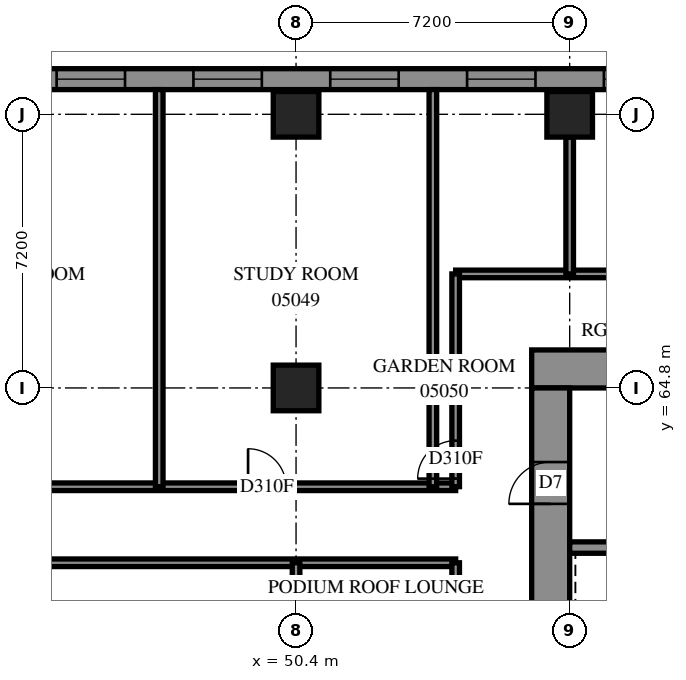
"""IFC4 building model, lengths in metres.
Left out: names, types, materials, properties, quantities, classifications, styles, units other than length and angle.
Written with IfcOpenShell. Run it as: python <this file> out.ifc"""

import sys

from ifc_helpers import new_model, si_unit, direction, frame, frame_2d, origin, origin_2d, place, context, subcontext, project, spatial, polyline, rectangle, outline, extrude, element, fill, save


model = new_model("IFC4")
c1 = context("Model", 3, precision=1e-05, world=origin(), true_north=direction((0.0, 1.0)))
c2 = subcontext(c1, "Body", "Model", "MODEL_VIEW")
j1 = project(units=[si_unit("LENGTHUNIT", "METRE"), si_unit("PLANEANGLEUNIT", "RADIAN")], contexts=[c1])
p1 = place(None, origin())
s1 = spatial("IfcSite", under=j1, at=p1, CompositionType="ELEMENT")
p2 = place(p1, origin())
s2 = spatial("IfcBuilding", under=s1, at=p2, CompositionType="ELEMENT")
p3 = place(p2, frame((0.0, 0.0, 22.8)))
s3 = spatial("IfcBuildingStorey", under=s2, at=p3, CompositionType="ELEMENT", Elevation=22.8)
for number, where, z_axis, x_axis in (
    (1, (50.4, 64.8, 0.0), (0.0, 0.0, 1.0), (1.0, 0.0, 0.0)),
    (2, (50.4, 72.0, 0.0), (0.0, 0.0, 1.0), (1.0, 0.0, 0.0)),
    (3, (57.6, 72.0, 0.0), (0.0, 0.0, 1.0), (1.0, 0.0, 0.0)),
):
    element("IfcColumn", number, at=place(p3, frame(where, z_axis=z_axis, x_axis=x_axis)), inside=s3, PredefinedType="COLUMN", context=c2, shape_type="SweptSolid", body=[
        extrude(rectangle(XDim=1.2, YDim=1.2, at=origin_2d()), origin(), (0.0, 0.0, 1.0), 3.9),
    ])
p4 = place(p3, frame((56.6, 65.3, -0.4), z_axis=(0.0, 0.0, 1.0), x_axis=(1.0, 0.0, 0.0)))
e4 = element("IfcWall", 4, at=p4, inside=s3, PredefinedType="SHEAR", context=c2, shape_type="SweptSolid", body=[
    extrude(rectangle(XDim=16.4, YDim=1.0, at=frame_2d((8.2, 0.0))), origin(), (0.0, 0.0, 1.0), 3.6),
])
p5 = place(p4, frame((11.0, 0.0, 0.4)))
e5 = element("IfcOpeningElement", 5, at=p5, cuts=e4, PredefinedType="OPENING", context=c2, shape_type="SweptSolid", body=[
    extrude(rectangle(XDim=0.8, YDim=2.1, at=frame_2d((0.4, 1.05))), frame((0.0, 0.51, 0.0), z_axis=(0.0, -1.0, 0.0), x_axis=(1.0, 0.0, 0.0)), (0.0, 0.0, 1.0), 1.02),
])
p6 = place(p3, frame((57.1, 50.4, -0.4), z_axis=(0.0, 0.0, 1.0), x_axis=(0.0, 1.0, 0.0)))
e6 = element("IfcWall", 6, at=p6, inside=s3, PredefinedType="SHEAR", context=c2, shape_type="SweptSolid", body=[
    extrude(rectangle(XDim=14.4, YDim=1.0, at=frame_2d((7.2, 0.0))), origin(), (0.0, 0.0, 1.0), 3.6),
])
p7 = place(p6, frame((4.55, 0.0, 0.4)))
e7 = element("IfcOpeningElement", 7, at=p7, cuts=e6, PredefinedType="OPENING", context=c2, shape_type="SweptSolid", body=[
    extrude(rectangle(XDim=1.1, YDim=2.1, at=frame_2d((0.55, 1.05))), frame((0.0, 0.51, 0.0), z_axis=(0.0, -1.0, 0.0), x_axis=(1.0, 0.0, 0.0)), (0.0, 0.0, 1.0), 1.02),
])
p8 = place(p6, frame((11.35, 0.0, 0.4)))
e8 = element("IfcOpeningElement", 8, at=p8, cuts=e6, PredefinedType="OPENING", context=c2, shape_type="SweptSolid", body=[
    extrude(rectangle(XDim=1.1, YDim=2.1, at=frame_2d((0.55, 1.05))), frame((0.0, 0.51, 0.0), z_axis=(0.0, -1.0, 0.0), x_axis=(1.0, 0.0, 0.0)), (0.0, 0.0, 1.0), 1.02),
])
p9 = place(p3, frame((57.6, 60.6, 0.0), z_axis=(0.0, 0.0, 1.0), x_axis=(1.0, 0.0, 0.0)))
e9 = element("IfcWall", 9, at=p9, inside=s3, PredefinedType="SOLIDWALL", context=c2, shape_type="SweptSolid", body=[
    extrude(rectangle(XDim=7.2, YDim=0.3, at=frame_2d((3.6, 0.0))), origin(), (0.0, 0.0, 1.0), 3.9),
])
p10 = place(p3, frame((79.583, 72.925, 0.0), z_axis=(0.0, 0.0, 1.0), x_axis=(-1.0, 0.0, 0.0)))
e10 = element("IfcWall", 10, at=p10, inside=s3, PredefinedType="SOLIDWALL", context=c2, shape_type="SweptSolid", body=[
    extrude(outline(polyline([(-0.114, -0.275), (79.583, -0.275), (79.033, 0.275), (0.114, 0.275), (-0.114, -0.275)])), origin(), (0.0, 0.0, 1.0), 3.9),
])
p11 = place(p10, frame((1.249, 0.0, 0.7)))
e11 = element("IfcOpeningElement", 11, at=p11, cuts=e10, PredefinedType="OPENING", context=c2, shape_type="SweptSolid", body=[
    extrude(rectangle(XDim=1.8, YDim=2.4, at=frame_2d((0.9, 1.2))), frame((0.0, 0.285, 0.0), z_axis=(0.0, -1.0, 0.0), x_axis=(1.0, 0.0, 0.0)), (0.0, 0.0, 1.0), 0.57),
])
p12 = place(p10, frame((4.883, 0.0, 0.7)))
e12 = element("IfcOpeningElement", 12, at=p12, cuts=e10, PredefinedType="OPENING", context=c2, shape_type="SweptSolid", body=[
    extrude(rectangle(XDim=1.8, YDim=2.4, at=frame_2d((0.9, 1.2))), frame((0.0, 0.285, 0.0), z_axis=(0.0, -1.0, 0.0), x_axis=(1.0, 0.0, 0.0)), (0.0, 0.0, 1.0), 0.57),
])
p13 = place(p10, frame((8.483, 0.0, 0.7)))
e13 = element("IfcOpeningElement", 13, at=p13, cuts=e10, PredefinedType="OPENING", context=c2, shape_type="SweptSolid", body=[
    extrude(rectangle(XDim=1.8, YDim=2.4, at=frame_2d((0.9, 1.2))), frame((0.0, 0.285, 0.0), z_axis=(0.0, -1.0, 0.0), x_axis=(1.0, 0.0, 0.0)), (0.0, 0.0, 1.0), 0.57),
])
p14 = place(p10, frame((12.083, 0.0, 0.7)))
e14 = element("IfcOpeningElement", 14, at=p14, cuts=e10, PredefinedType="OPENING", context=c2, shape_type="SweptSolid", body=[
    extrude(rectangle(XDim=1.8, YDim=2.4, at=frame_2d((0.9, 1.2))), frame((0.0, 0.285, 0.0), z_axis=(0.0, -1.0, 0.0), x_axis=(1.0, 0.0, 0.0)), (0.0, 0.0, 1.0), 0.57),
])
p15 = place(p10, frame((15.683, 0.0, 0.7)))
e15 = element("IfcOpeningElement", 15, at=p15, cuts=e10, PredefinedType="OPENING", context=c2, shape_type="SweptSolid", body=[
    extrude(rectangle(XDim=1.8, YDim=2.4, at=frame_2d((0.9, 1.2))), frame((0.0, 0.285, 0.0), z_axis=(0.0, -1.0, 0.0), x_axis=(1.0, 0.0, 0.0)), (0.0, 0.0, 1.0), 0.57),
])
p16 = place(p10, frame((19.283, 0.0, 0.7)))
e16 = element("IfcOpeningElement", 16, at=p16, cuts=e10, PredefinedType="OPENING", context=c2, shape_type="SweptSolid", body=[
    extrude(rectangle(XDim=1.8, YDim=2.4, at=frame_2d((0.9, 1.2))), frame((0.0, 0.285, 0.0), z_axis=(0.0, -1.0, 0.0), x_axis=(1.0, 0.0, 0.0)), (0.0, 0.0, 1.0), 0.57),
])
p17 = place(p10, frame((22.883, 0.0, 0.7)))
e17 = element("IfcOpeningElement", 17, at=p17, cuts=e10, PredefinedType="OPENING", context=c2, shape_type="SweptSolid", body=[
    extrude(rectangle(XDim=1.8, YDim=2.4, at=frame_2d((0.9, 1.2))), frame((0.0, 0.285, 0.0), z_axis=(0.0, -1.0, 0.0), x_axis=(1.0, 0.0, 0.0)), (0.0, 0.0, 1.0), 0.57),
])
p18 = place(p10, frame((26.483, 0.0, 0.7)))
e18 = element("IfcOpeningElement", 18, at=p18, cuts=e10, PredefinedType="OPENING", context=c2, shape_type="SweptSolid", body=[
    extrude(rectangle(XDim=1.8, YDim=2.4, at=frame_2d((0.9, 1.2))), frame((0.0, 0.285, 0.0), z_axis=(0.0, -1.0, 0.0), x_axis=(1.0, 0.0, 0.0)), (0.0, 0.0, 1.0), 0.57),
])
p19 = place(p10, frame((30.083, 0.0, 0.7)))
e19 = element("IfcOpeningElement", 19, at=p19, cuts=e10, PredefinedType="OPENING", context=c2, shape_type="SweptSolid", body=[
    extrude(rectangle(XDim=1.8, YDim=2.4, at=frame_2d((0.9, 1.2))), frame((0.0, 0.285, 0.0), z_axis=(0.0, -1.0, 0.0), x_axis=(1.0, 0.0, 0.0)), (0.0, 0.0, 1.0), 0.57),
])
p20 = place(p10, frame((33.683, 0.0, 0.7)))
e20 = element("IfcOpeningElement", 20, at=p20, cuts=e10, PredefinedType="OPENING", context=c2, shape_type="SweptSolid", body=[
    extrude(rectangle(XDim=1.8, YDim=2.4, at=frame_2d((0.9, 1.2))), frame((0.0, 0.285, 0.0), z_axis=(0.0, -1.0, 0.0), x_axis=(1.0, 0.0, 0.0)), (0.0, 0.0, 1.0), 0.57),
])
p21 = place(p10, frame((37.283, 0.0, 0.7)))
e21 = element("IfcOpeningElement", 21, at=p21, cuts=e10, PredefinedType="OPENING", context=c2, shape_type="SweptSolid", body=[
    extrude(rectangle(XDim=1.8, YDim=2.4, at=frame_2d((0.9, 1.2))), frame((0.0, 0.285, 0.0), z_axis=(0.0, -1.0, 0.0), x_axis=(1.0, 0.0, 0.0)), (0.0, 0.0, 1.0), 0.57),
])
p22 = place(p10, frame((40.883, 0.0, 0.7)))
e22 = element("IfcOpeningElement", 22, at=p22, cuts=e10, PredefinedType="OPENING", context=c2, shape_type="SweptSolid", body=[
    extrude(rectangle(XDim=1.8, YDim=2.4, at=frame_2d((0.9, 1.2))), frame((0.0, 0.285, 0.0), z_axis=(0.0, -1.0, 0.0), x_axis=(1.0, 0.0, 0.0)), (0.0, 0.0, 1.0), 0.57),
])
p23 = place(p10, frame((44.483, 0.0, 0.7)))
e23 = element("IfcOpeningElement", 23, at=p23, cuts=e10, PredefinedType="OPENING", context=c2, shape_type="SweptSolid", body=[
    extrude(rectangle(XDim=1.8, YDim=2.4, at=frame_2d((0.9, 1.2))), frame((0.0, 0.285, 0.0), z_axis=(0.0, -1.0, 0.0), x_axis=(1.0, 0.0, 0.0)), (0.0, 0.0, 1.0), 0.57),
])
p24 = place(p10, frame((48.083, 0.0, 0.7)))
e24 = element("IfcOpeningElement", 24, at=p24, cuts=e10, PredefinedType="OPENING", context=c2, shape_type="SweptSolid", body=[
    extrude(rectangle(XDim=1.8, YDim=2.4, at=frame_2d((0.9, 1.2))), frame((0.0, 0.285, 0.0), z_axis=(0.0, -1.0, 0.0), x_axis=(1.0, 0.0, 0.0)), (0.0, 0.0, 1.0), 0.57),
])
p25 = place(p10, frame((51.683, 0.0, 0.7)))
e25 = element("IfcOpeningElement", 25, at=p25, cuts=e10, PredefinedType="OPENING", context=c2, shape_type="SweptSolid", body=[
    extrude(rectangle(XDim=1.8, YDim=2.4, at=frame_2d((0.9, 1.2))), frame((0.0, 0.285, 0.0), z_axis=(0.0, -1.0, 0.0), x_axis=(1.0, 0.0, 0.0)), (0.0, 0.0, 1.0), 0.57),
])
p26 = place(p10, frame((55.283, 0.0, 0.7)))
e26 = element("IfcOpeningElement", 26, at=p26, cuts=e10, PredefinedType="OPENING", context=c2, shape_type="SweptSolid", body=[
    extrude(rectangle(XDim=1.8, YDim=2.4, at=frame_2d((0.9, 1.2))), frame((0.0, 0.285, 0.0), z_axis=(0.0, -1.0, 0.0), x_axis=(1.0, 0.0, 0.0)), (0.0, 0.0, 1.0), 0.57),
])
p27 = place(p10, frame((58.883, 0.0, 0.7)))
e27 = element("IfcOpeningElement", 27, at=p27, cuts=e10, PredefinedType="OPENING", context=c2, shape_type="SweptSolid", body=[
    extrude(rectangle(XDim=1.8, YDim=2.4, at=frame_2d((0.9, 1.2))), frame((0.0, 0.285, 0.0), z_axis=(0.0, -1.0, 0.0), x_axis=(1.0, 0.0, 0.0)), (0.0, 0.0, 1.0), 0.57),
])
p28 = place(p10, frame((62.483, 0.0, 0.7)))
e28 = element("IfcOpeningElement", 28, at=p28, cuts=e10, PredefinedType="OPENING", context=c2, shape_type="SweptSolid", body=[
    extrude(rectangle(XDim=1.8, YDim=2.4, at=frame_2d((0.9, 1.2))), frame((0.0, 0.285, 0.0), z_axis=(0.0, -1.0, 0.0), x_axis=(1.0, 0.0, 0.0)), (0.0, 0.0, 1.0), 0.57),
])
p29 = place(p10, frame((66.083, 0.0, 0.7)))
e29 = element("IfcOpeningElement", 29, at=p29, cuts=e10, PredefinedType="OPENING", context=c2, shape_type="SweptSolid", body=[
    extrude(rectangle(XDim=1.8, YDim=2.4, at=frame_2d((0.9, 1.2))), frame((0.0, 0.285, 0.0), z_axis=(0.0, -1.0, 0.0), x_axis=(1.0, 0.0, 0.0)), (0.0, 0.0, 1.0), 0.57),
])
p30 = place(p10, frame((69.683, 0.0, 0.7)))
e30 = element("IfcOpeningElement", 30, at=p30, cuts=e10, PredefinedType="OPENING", context=c2, shape_type="SweptSolid", body=[
    extrude(rectangle(XDim=1.8, YDim=2.4, at=frame_2d((0.9, 1.2))), frame((0.0, 0.285, 0.0), z_axis=(0.0, -1.0, 0.0), x_axis=(1.0, 0.0, 0.0)), (0.0, 0.0, 1.0), 0.57),
])
p31 = place(p10, frame((73.683, 0.0, 0.7)))
e31 = element("IfcOpeningElement", 31, at=p31, cuts=e10, PredefinedType="OPENING", context=c2, shape_type="SweptSolid", body=[
    extrude(rectangle(XDim=1.8, YDim=2.4, at=frame_2d((0.9, 1.2))), frame((0.0, 0.285, 0.0), z_axis=(0.0, -1.0, 0.0), x_axis=(1.0, 0.0, 0.0)), (0.0, 0.0, 1.0), 0.57),
])
p32 = place(p10, frame((76.508, 0.0, 0.7)))
e32 = element("IfcOpeningElement", 32, at=p32, cuts=e10, PredefinedType="OPENING", context=c2, shape_type="SweptSolid", body=[
    extrude(rectangle(XDim=1.8, YDim=2.4, at=frame_2d((0.9, 1.2))), frame((0.0, 0.285, 0.0), z_axis=(0.0, -1.0, 0.0), x_axis=(1.0, 0.0, 0.0)), (0.0, 0.0, 1.0), 0.57),
])
p33 = place(p3, frame((0.002, 60.2, 0.0), z_axis=(0.0, 0.0, 1.0), x_axis=(1.0, 0.0, 0.0)))
e33 = element("IfcWall", 33, at=p33, inside=s3, PredefinedType="PARTITIONING", context=c2, shape_type="SweptSolid", body=[
    extrude(rectangle(XDim=54.598, YDim=0.2, at=frame_2d((27.299, 0.0))), origin(), (0.0, 0.0, 1.0), 3.9),
])
p34 = place(p33, frame((3.863, 0.0, 0.0)))
e34 = element("IfcOpeningElement", 34, at=p34, cuts=e33, PredefinedType="OPENING", context=c2, shape_type="SweptSolid", body=[
    extrude(rectangle(XDim=1.0, YDim=2.1, at=frame_2d((0.5, 1.05))), frame((0.0, 0.11, 0.0), z_axis=(0.0, -1.0, 0.0), x_axis=(1.0, 0.0, 0.0)), (0.0, 0.0, 1.0), 0.22),
])
p35 = place(p3, frame((0.002, 62.2, 0.0), z_axis=(0.0, 0.0, 1.0), x_axis=(1.0, 0.0, 0.0)))
e35 = element("IfcWall", 35, at=p35, inside=s3, PredefinedType="PARTITIONING", context=c2, shape_type="SweptSolid", body=[
    extrude(rectangle(XDim=54.598, YDim=0.2, at=frame_2d((27.299, 0.0))), origin(), (0.0, 0.0, 1.0), 3.9),
])
p36 = place(p35, frame((8.667, 0.0, 0.0)))
e36 = element("IfcOpeningElement", 36, at=p36, cuts=e35, PredefinedType="OPENING", context=c2, shape_type="SweptSolid", body=[
    extrude(rectangle(XDim=1.0, YDim=2.1, at=frame_2d((0.5, 1.05))), frame((0.0, 0.11, 0.0), z_axis=(0.0, -1.0, 0.0), x_axis=(1.0, 0.0, 0.0)), (0.0, 0.0, 1.0), 0.22),
])
p37 = place(p35, frame((13.136, 0.0, 0.0)))
e37 = element("IfcOpeningElement", 37, at=p37, cuts=e35, PredefinedType="OPENING", context=c2, shape_type="SweptSolid", body=[
    extrude(rectangle(XDim=1.0, YDim=2.1, at=frame_2d((0.5, 1.05))), frame((0.0, 0.11, 0.0), z_axis=(0.0, -1.0, 0.0), x_axis=(1.0, 0.0, 0.0)), (0.0, 0.0, 1.0), 0.22),
])
p38 = place(p35, frame((20.335, 0.0, 0.0)))
e38 = element("IfcOpeningElement", 38, at=p38, cuts=e35, PredefinedType="OPENING", context=c2, shape_type="SweptSolid", body=[
    extrude(rectangle(XDim=1.0, YDim=2.1, at=frame_2d((0.5, 1.05))), frame((0.0, 0.11, 0.0), z_axis=(0.0, -1.0, 0.0), x_axis=(1.0, 0.0, 0.0)), (0.0, 0.0, 1.0), 0.22),
])
p39 = place(p35, frame((27.535, 0.0, 0.0)))
e39 = element("IfcOpeningElement", 39, at=p39, cuts=e35, PredefinedType="OPENING", context=c2, shape_type="SweptSolid", body=[
    extrude(rectangle(XDim=1.0, YDim=2.1, at=frame_2d((0.5, 1.05))), frame((0.0, 0.11, 0.0), z_axis=(0.0, -1.0, 0.0), x_axis=(1.0, 0.0, 0.0)), (0.0, 0.0, 1.0), 0.22),
])
p40 = place(p35, frame((34.736, 0.0, 0.0)))
e40 = element("IfcOpeningElement", 40, at=p40, cuts=e35, PredefinedType="OPENING", context=c2, shape_type="SweptSolid", body=[
    extrude(rectangle(XDim=1.0, YDim=2.1, at=frame_2d((0.5, 1.05))), frame((0.0, 0.11, 0.0), z_axis=(0.0, -1.0, 0.0), x_axis=(1.0, 0.0, 0.0)), (0.0, 0.0, 1.0), 0.22),
])
p41 = place(p35, frame((41.935, 0.0, 0.0)))
e41 = element("IfcOpeningElement", 41, at=p41, cuts=e35, PredefinedType="OPENING", context=c2, shape_type="SweptSolid", body=[
    extrude(rectangle(XDim=1.0, YDim=2.1, at=frame_2d((0.5, 1.05))), frame((0.0, 0.11, 0.0), z_axis=(0.0, -1.0, 0.0), x_axis=(1.0, 0.0, 0.0)), (0.0, 0.0, 1.0), 0.22),
])
p42 = place(p35, frame((49.136, 0.0, 0.0)))
e42 = element("IfcOpeningElement", 42, at=p42, cuts=e35, PredefinedType="OPENING", context=c2, shape_type="SweptSolid", body=[
    extrude(rectangle(XDim=1.0, YDim=2.1, at=frame_2d((0.5, 1.05))), frame((0.0, 0.11, 0.0), z_axis=(0.0, -1.0, 0.0), x_axis=(1.0, 0.0, 0.0)), (0.0, 0.0, 1.0), 0.22),
])
p43 = place(p35, frame((4.803, 0.0, 0.0)))
e43 = element("IfcOpeningElement", 43, at=p43, cuts=e35, PredefinedType="OPENING", context=c2, shape_type="SweptSolid", body=[
    extrude(rectangle(XDim=1.0, YDim=2.1, at=frame_2d((0.5, 1.05))), frame((0.0, 0.11, 0.0), z_axis=(0.0, -1.0, 0.0), x_axis=(1.0, 0.0, 0.0)), (0.0, 0.0, 1.0), 0.22),
])
p44 = place(p3, frame((54.6, 67.8, 0.0), z_axis=(0.0, 0.0, 1.0), x_axis=(1.0, 0.0, 0.0)))
e44 = element("IfcWall", 44, at=p44, inside=s3, PredefinedType="PARTITIONING", context=c2, shape_type="SweptSolid", body=[
    extrude(rectangle(XDim=20.4, YDim=0.2, at=frame_2d((10.2, 0.0))), origin(), (0.0, 0.0, 1.0), 3.9),
])
p45 = place(p44, frame((19.271, 0.0, 0.0)))
e45 = element("IfcOpeningElement", 45, at=p45, cuts=e44, PredefinedType="OPENING", context=c2, shape_type="SweptSolid", body=[
    extrude(rectangle(XDim=1.0, YDim=2.1, at=frame_2d((0.5, 1.05))), frame((0.0, 0.11, 0.0), z_axis=(0.0, -1.0, 0.0), x_axis=(1.0, 0.0, 0.0)), (0.0, 0.0, 1.0), 0.22),
])
p46 = place(p44, frame((6.862, 0.0, 0.0)))
e46 = element("IfcOpeningElement", 46, at=p46, cuts=e44, PredefinedType="OPENING", context=c2, shape_type="SweptSolid", body=[
    extrude(rectangle(XDim=1.0, YDim=2.1, at=frame_2d((0.5, 1.05))), frame((0.0, 0.11, 0.0), z_axis=(0.0, -1.0, 0.0), x_axis=(1.0, 0.0, 0.0)), (0.0, 0.0, 1.0), 0.22),
])
p47 = place(p44, frame((14.062, 0.0, 0.0)))
e47 = element("IfcOpeningElement", 47, at=p47, cuts=e44, PredefinedType="OPENING", context=c2, shape_type="SweptSolid", body=[
    extrude(rectangle(XDim=1.0, YDim=2.1, at=frame_2d((0.5, 1.05))), frame((0.0, 0.11, 0.0), z_axis=(0.0, -1.0, 0.0), x_axis=(1.0, 0.0, 0.0)), (0.0, 0.0, 1.0), 0.22),
])
for number, where, z_axis, x_axis in (
    (48, (46.8, 62.2, 0.0), (0.0, 0.0, 1.0), (0.0, 1.0, 0.0)),
    (49, (54.0, 62.2, 0.0), (0.0, 0.0, 1.0), (0.0, 1.0, 0.0)),
):
    element("IfcWall", number, at=place(p3, frame(where, z_axis=z_axis, x_axis=x_axis)), inside=s3, PredefinedType="PARTITIONING", context=c2, shape_type="SweptSolid", body=[
        extrude(rectangle(XDim=10.45, YDim=0.2, at=frame_2d((5.225, 0.0))), origin(), (0.0, 0.0, 1.0), 3.9),
    ])
p48 = place(p3, frame((54.6, 62.202, 0.0), z_axis=(0.0, 0.0, 1.0), x_axis=(0.0, 1.0, 0.0)))
e50 = element("IfcWall", 50, at=p48, inside=s3, PredefinedType="PARTITIONING", context=c2, shape_type="SweptSolid", body=[
    extrude(rectangle(XDim=5.598, YDim=0.2, at=frame_2d((2.799, 0.0))), origin(), (0.0, 0.0, 1.0), 3.9),
])
p49 = place(p48, frame((0.212, 0.0, 0.0)))
e51 = element("IfcOpeningElement", 51, at=p49, cuts=e50, PredefinedType="OPENING", context=c2, shape_type="SweptSolid", body=[
    extrude(rectangle(XDim=1.0, YDim=2.1, at=frame_2d((0.5, 1.05))), frame((0.0, 0.11, 0.0), z_axis=(0.0, -1.0, 0.0), x_axis=(1.0, 0.0, 0.0)), (0.0, 0.0, 1.0), 0.22),
])
p50 = place(p3, frame((54.6, 55.002, 0.0), z_axis=(0.0, 0.0, 1.0), x_axis=(0.0, 1.0, 0.0)))
e52 = element("IfcWall", 52, at=p50, inside=s3, PredefinedType="PARTITIONING", context=c2, shape_type="SweptSolid", body=[
    extrude(rectangle(XDim=5.198, YDim=0.2, at=frame_2d((2.599, 0.0))), origin(), (0.0, 0.0, 1.0), 3.9),
])
p51 = place(p3, frame((57.6, 67.8, 0.0), z_axis=(0.0, 0.0, 1.0), x_axis=(0.0, 1.0, 0.0)))
e53 = element("IfcWall", 53, at=p51, inside=s3, PredefinedType="PARTITIONING", context=c2, shape_type="SweptSolid", body=[
    extrude(rectangle(XDim=3.6, YDim=0.2, at=frame_2d((1.8, 0.0))), origin(), (0.0, 0.0, 1.0), 3.9),
])
p52 = place(p3, frame((50.4, 58.2, 0.0), z_axis=(0.0, 0.0, 1.0), x_axis=(0.0, 1.0, 0.0)))
e54 = element("IfcWall", 54, at=p52, inside=s3, PredefinedType="PARTITIONING", context=c2, shape_type="SweptSolid", body=[
    extrude(rectangle(XDim=2.0, YDim=0.2, at=frame_2d((1.0, 0.0))), origin(), (0.0, 0.0, 1.0), 3.9),
])
p53 = place(p16, origin())
e55 = element("IfcWindow", 55, at=p53, inside=s3, PartitioningType="SINGLE_PANEL", PredefinedType="WINDOW", context=c2, shape_type="SweptSolid", body=[
    extrude(rectangle(XDim=1.8, YDim=2.4, at=frame_2d((0.9, 1.2))), frame((0.0, 0.155, 0.0), z_axis=(0.0, -1.0, 0.0), x_axis=(1.0, 0.0, 0.0)), (0.0, 0.0, 1.0), 0.06),
])
fill(e16, e55)
p54 = place(p17, origin())
e56 = element("IfcWindow", 56, at=p54, inside=s3, PartitioningType="SINGLE_PANEL", PredefinedType="WINDOW", context=c2, shape_type="SweptSolid", body=[
    extrude(rectangle(XDim=1.8, YDim=2.4, at=frame_2d((0.9, 1.2))), frame((0.0, 0.155, 0.0), z_axis=(0.0, -1.0, 0.0), x_axis=(1.0, 0.0, 0.0)), (0.0, 0.0, 1.0), 0.06),
])
fill(e17, e56)
p55 = place(p18, origin())
e57 = element("IfcWindow", 57, at=p55, inside=s3, PartitioningType="SINGLE_PANEL", PredefinedType="WINDOW", context=c2, shape_type="SweptSolid", body=[
    extrude(rectangle(XDim=1.8, YDim=2.4, at=frame_2d((0.9, 1.2))), frame((0.0, 0.155, 0.0), z_axis=(0.0, -1.0, 0.0), x_axis=(1.0, 0.0, 0.0)), (0.0, 0.0, 1.0), 0.06),
])
fill(e18, e57)
p56 = place(p19, origin())
e58 = element("IfcWindow", 58, at=p56, inside=s3, PartitioningType="SINGLE_PANEL", PredefinedType="WINDOW", context=c2, shape_type="SweptSolid", body=[
    extrude(rectangle(XDim=1.8, YDim=2.4, at=frame_2d((0.9, 1.2))), frame((0.0, 0.155, 0.0), z_axis=(0.0, -1.0, 0.0), x_axis=(1.0, 0.0, 0.0)), (0.0, 0.0, 1.0), 0.06),
])
fill(e19, e58)
p57 = place(p20, origin())
e59 = element("IfcWindow", 59, at=p57, inside=s3, PartitioningType="SINGLE_PANEL", PredefinedType="WINDOW", context=c2, shape_type="SweptSolid", body=[
    extrude(rectangle(XDim=1.8, YDim=2.4, at=frame_2d((0.9, 1.2))), frame((0.0, 0.155, 0.0), z_axis=(0.0, -1.0, 0.0), x_axis=(1.0, 0.0, 0.0)), (0.0, 0.0, 1.0), 0.06),
])
fill(e20, e59)
p58 = place(p8, origin())
e60 = element("IfcDoor", 60, at=p58, inside=s3, OperationType="SINGLE_SWING_LEFT", PredefinedType="DOOR", context=c2, shape_type="SweptSolid", body=[
    extrude(rectangle(XDim=1.1, YDim=2.1, at=frame_2d((0.55, 1.05))), frame((0.0, 0.025, 0.0), z_axis=(0.0, -1.0, 0.0), x_axis=(1.0, 0.0, 0.0)), (0.0, 0.0, 1.0), 0.05),
])
fill(e8, e60)
p59 = place(p42, origin())
e61 = element("IfcDoor", 61, at=p59, inside=s3, OperationType="SINGLE_SWING_LEFT", PredefinedType="DOOR", context=c2, shape_type="SweptSolid", body=[
    extrude(rectangle(XDim=1.0, YDim=2.1, at=frame_2d((0.5, 1.05))), frame((0.0, 0.025, 0.0), z_axis=(0.0, -1.0, 0.0), x_axis=(1.0, 0.0, 0.0)), (0.0, 0.0, 1.0), 0.05),
])
fill(e42, e61)
p60 = place(p49, origin())
e62 = element("IfcDoor", 62, at=p60, inside=s3, OperationType="SINGLE_SWING_LEFT", PredefinedType="DOOR", context=c2, shape_type="SweptSolid", body=[
    extrude(rectangle(XDim=1.0, YDim=2.1, at=frame_2d((0.5, 1.05))), frame((0.0, 0.025, 0.0), z_axis=(0.0, -1.0, 0.0), x_axis=(1.0, 0.0, 0.0)), (0.0, 0.0, 1.0), 0.05),
])
fill(e51, e62)
save(model, sys.argv[1])
